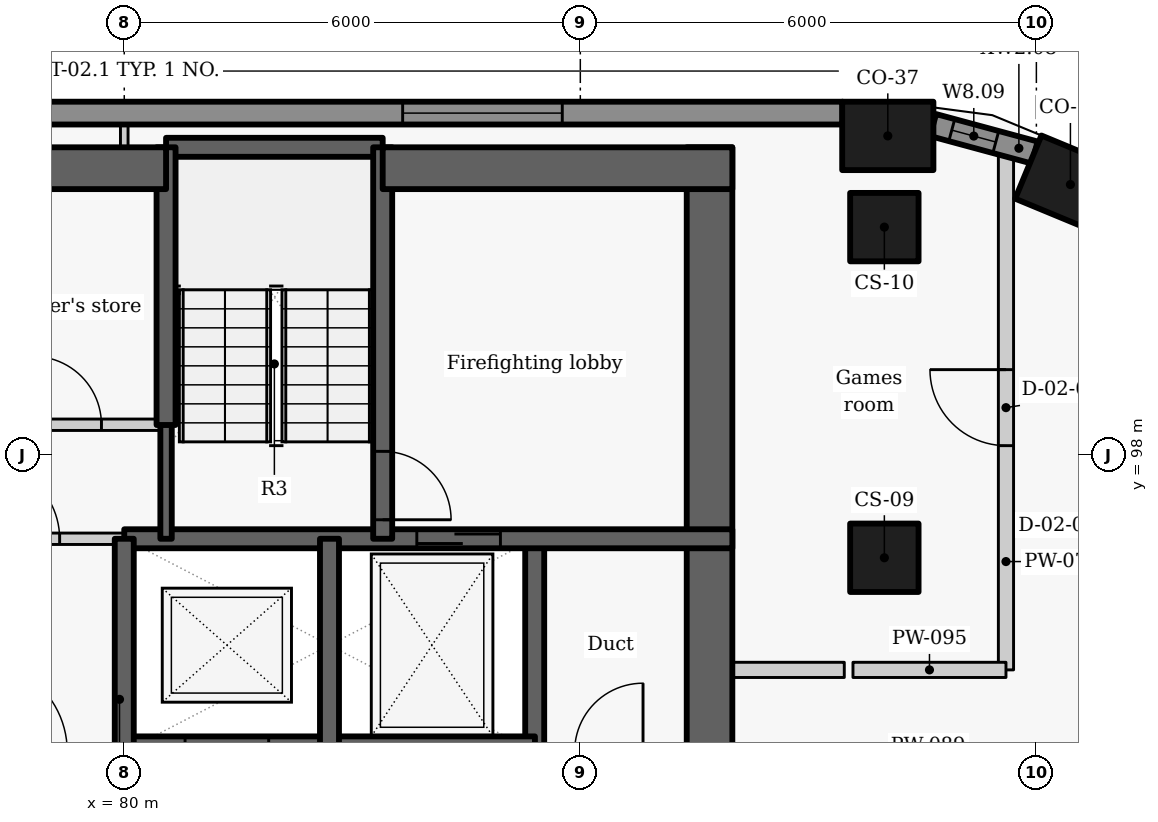
"""IFC4 building model, lengths in metres.
Left out: names, types, materials, properties, quantities, classifications, styles, units other than length and angle.
Written with IfcOpenShell. Run it as: python <this file> out.ifc"""

import sys

from ifc_helpers import new_model, si_unit, direction, frame, frame_2d, origin, origin_2d, place, context, subcontext, project, spatial, rectangle, extrude, element, fill, save


model = new_model("IFC4")
c1 = context("Model", 3, precision=1e-05, world=origin(), true_north=direction((0.0, 1.0)))
c2 = subcontext(c1, "Body", "Model", "MODEL_VIEW")
j1 = project(units=[si_unit("LENGTHUNIT", "METRE"), si_unit("PLANEANGLEUNIT", "RADIAN")], contexts=[c1])
p1 = place(None, origin())
s1 = spatial("IfcSite", under=j1, at=p1, CompositionType="ELEMENT")
p2 = place(p1, origin())
s2 = spatial("IfcBuilding", under=s1, at=p2, CompositionType="ELEMENT")
p3 = place(p2, frame((0.0, 0.0, 193.2)))
s3 = spatial("IfcBuildingStorey", under=s2, at=p3, CompositionType="ELEMENT", Elevation=193.2)
for number, where, z_axis, x_axis in (
    (1, (92.448, 101.56, 0.0), (0.0, 0.0, 1.0), (-0.924, 0.383, 0.0)),
    (2, (90.045, 102.2, 0.0), (0.0, 0.0, 1.0), (-1.0, 0.0, 0.0)),
):
    element("IfcColumn", number, at=place(p3, frame(where, z_axis=z_axis, x_axis=x_axis)), inside=s3, PredefinedType="COLUMN", context=c2, shape_type="SweptSolid", body=[
        extrude(rectangle(XDim=1.2, YDim=0.9, at=origin_2d()), origin(), (0.0, 0.0, 1.0), 3.3),
    ])
for number, where, z_axis, x_axis in (
    (3, (90.0, 96.65, 0.0), (0.0, 0.0, 1.0), (0.0, 1.0, 0.0)),
    (4, (90.0, 101.0, 0.0), (0.0, 0.0, 1.0), (0.0, 1.0, 0.0)),
):
    element("IfcColumn", number, at=place(p3, frame(where, z_axis=z_axis, x_axis=x_axis)), inside=s3, PredefinedType="COLUMN", context=c2, shape_type="SweptSolid", body=[
        extrude(rectangle(XDim=0.9, YDim=0.9, at=origin_2d()), origin(), (0.0, 0.0, 1.0), 3.3),
    ])
p4 = place(p3, frame((91.977, 101.981, 0.0), z_axis=(0.0, 0.0, 1.0), x_axis=(-0.965315341278, 0.261086751661, 0.0)))
e5 = element("IfcWall", 5, at=p4, inside=s3, PredefinedType="SOLIDWALL", context=c2, shape_type="SweptSolid", body=[
    extrude(rectangle(XDim=1.384, YDim=0.3, at=frame_2d((0.692, 0.0))), origin(), (0.0, 0.0, 1.0), 2.425),
])
p5 = place(p4, frame((0.529, 0.0, 0.9)))
e6 = element("IfcOpeningElement", 6, at=p5, cuts=e5, PredefinedType="OPENING", context=c2, shape_type="SweptSolid", body=[
    extrude(rectangle(XDim=0.6, YDim=1.1, at=frame_2d((0.3, 0.55))), frame((0.0, 0.16, 0.0), z_axis=(0.0, -1.0, 0.0), x_axis=(1.0, 0.0, 0.0)), (0.0, 0.0, 1.0), 0.32),
])
p6 = place(p3, frame((89.449, 102.5, 0.0), z_axis=(0.0, 0.0, 1.0), x_axis=(-1.0, 0.0, 0.0)))
e7 = element("IfcWall", 7, at=p6, inside=s3, PredefinedType="SOLIDWALL", context=c2, shape_type="SweptSolid", body=[
    extrude(rectangle(XDim=18.933, YDim=0.3, at=frame_2d((9.466, 0.0))), origin(), (0.0, 0.0, 1.0), 2.425),
])
p7 = place(p6, frame((3.687, 0.0, 0.9)))
e8 = element("IfcOpeningElement", 8, at=p7, cuts=e7, PredefinedType="OPENING", context=c2, shape_type="SweptSolid", body=[
    extrude(rectangle(XDim=2.1, YDim=1.1, at=frame_2d((1.05, 0.55))), frame((0.0, 0.16, 0.0), z_axis=(0.0, -1.0, 0.0), x_axis=(1.0, 0.0, 0.0)), (0.0, 0.0, 1.0), 0.32),
])
p8 = place(p6, frame((13.118, 0.0, 0.9)))
e9 = element("IfcOpeningElement", 9, at=p8, cuts=e7, PredefinedType="OPENING", context=c2, shape_type="SweptSolid", body=[
    extrude(rectangle(XDim=2.1, YDim=1.1, at=frame_2d((1.05, 0.55))), frame((0.0, 0.16, 0.0), z_axis=(0.0, -1.0, 0.0), x_axis=(1.0, 0.0, 0.0)), (0.0, 0.0, 1.0), 0.32),
])
p9 = place(p3, frame((85.4, 94.1, -0.275), z_axis=(0.0, 0.0, 1.0), x_axis=(0.0, 1.0, 0.0)))
e10 = element("IfcWall", 10, at=p9, inside=s3, PredefinedType="SHEAR", context=c2, shape_type="SweptSolid", body=[
    extrude(rectangle(XDim=2.8, YDim=0.25, at=frame_2d((1.4, 0.0))), origin(), (0.0, 0.0, 1.0), 3.3),
])
p10 = place(p3, frame((87.7, 102.05, -0.275), z_axis=(0.0, 0.0, 1.0), x_axis=(0.0, -1.0, 0.0)))
e11 = element("IfcWall", 11, at=p10, inside=s3, PredefinedType="SHEAR", context=c2, shape_type="SweptSolid", body=[
    extrude(rectangle(XDim=14.25, YDim=0.6, at=frame_2d((7.125, 0.0))), origin(), (0.0, 0.0, 1.0), 3.3),
])
p11 = place(p10, frame((8.898, 0.0, 0.275)))
e12 = element("IfcOpeningElement", 12, at=p11, cuts=e11, PredefinedType="OPENING", context=c2, shape_type="SweptSolid", body=[
    extrude(rectangle(XDim=1.5, YDim=2.1, at=frame_2d((0.75, 1.05))), frame((0.0, 0.31, 0.0), z_axis=(0.0, -1.0, 0.0), x_axis=(1.0, 0.0, 0.0)), (0.0, 0.0, 1.0), 0.62),
])
p12 = place(p3, frame((79.997, 94.1, -0.275), z_axis=(0.0, 0.0, 1.0), x_axis=(1.0, 0.0, 0.0)))
e13 = element("IfcWall", 13, at=p12, inside=s3, PredefinedType="SHEAR", context=c2, shape_type="SweptSolid", body=[
    extrude(rectangle(XDim=5.406, YDim=0.4, at=frame_2d((2.703, 0.0))), origin(), (0.0, 0.0, 1.0), 3.3),
])
p13 = place(p12, frame((0.803, 0.0, 0.275)))
e14 = element("IfcOpeningElement", 14, at=p13, cuts=e13, PredefinedType="OPENING", context=c2, shape_type="SweptSolid", body=[
    extrude(rectangle(XDim=1.1, YDim=2.1, at=frame_2d((0.55, 1.05))), frame((0.0, 0.21, 0.0), z_axis=(0.0, -1.0, 0.0), x_axis=(1.0, 0.0, 0.0)), (0.0, 0.0, 1.0), 0.42),
])
p14 = place(p3, frame((80.0, 96.9, -0.275), z_axis=(0.0, 0.0, 1.0), x_axis=(1.0, 0.0, 0.0)))
e15 = element("IfcWall", 15, at=p14, inside=s3, PredefinedType="SHEAR", context=c2, shape_type="SweptSolid", body=[
    extrude(rectangle(XDim=8.0, YDim=0.25, at=frame_2d((4.0, 0.0))), origin(), (0.0, 0.0, 1.0), 3.3),
])
p15 = place(p14, frame((3.849, 0.0, 0.275)))
e16 = element("IfcOpeningElement", 16, at=p15, cuts=e15, PredefinedType="OPENING", context=c2, shape_type="SweptSolid", body=[
    extrude(rectangle(XDim=1.1, YDim=2.1, at=frame_2d((0.55, 1.05))), frame((0.0, 0.135, 0.0), z_axis=(0.0, -1.0, 0.0), x_axis=(1.0, 0.0, 0.0)), (0.0, 0.0, 1.0), 0.27),
])
p16 = place(p3, frame((80.0, 94.1, -0.275), z_axis=(0.0, 0.0, 1.0), x_axis=(0.0, 1.0, 0.0)))
e17 = element("IfcWall", 17, at=p16, inside=s3, PredefinedType="SHEAR", context=c2, shape_type="SweptSolid", body=[
    extrude(rectangle(XDim=2.8, YDim=0.25, at=frame_2d((1.4, 0.0))), origin(), (0.0, 0.0, 1.0), 3.3),
])
p17 = place(p3, frame((77.3, 96.9, 0.0), z_axis=(0.0, 0.0, 1.0), x_axis=(1.0, 0.0, 0.0)))
e18 = element("IfcWall", 18, at=p17, inside=s3, PredefinedType="PARTITIONING", context=c2, shape_type="SweptSolid", body=[
    extrude(rectangle(XDim=2.7, YDim=0.15, at=frame_2d((1.35, 0.0))), origin(), (0.0, 0.0, 1.0), 3.025),
])
p18 = place(p17, frame((0.85, 0.0, 0.0)))
e19 = element("IfcOpeningElement", 19, at=p18, cuts=e18, PredefinedType="OPENING", context=c2, shape_type="SweptSolid", body=[
    extrude(rectangle(XDim=1.0, YDim=2.1, at=frame_2d((0.5, 1.05))), frame((0.0, 0.085, 0.0), z_axis=(0.0, -1.0, 0.0), x_axis=(1.0, 0.0, 0.0)), (0.0, 0.0, 1.0), 0.17),
])
p19 = place(p3, frame((82.7, 94.1, -0.275), z_axis=(0.0, 0.0, 1.0), x_axis=(0.0, 1.0, 0.0)))
e20 = element("IfcWall", 20, at=p19, inside=s3, PredefinedType="SHEAR", context=c2, shape_type="SweptSolid", body=[
    extrude(rectangle(XDim=2.8, YDim=0.25, at=frame_2d((1.4, 0.0))), origin(), (0.0, 0.0, 1.0), 3.3),
])
p20 = place(p3, frame((80.55, 102.05, -0.275), z_axis=(0.0, 0.0, 1.0), x_axis=(1.0, 0.0, 0.0)))
e21 = element("IfcWall", 21, at=p20, inside=s3, PredefinedType="SHEAR", context=c2, shape_type="SweptSolid", body=[
    extrude(rectangle(XDim=2.85, YDim=0.25, at=frame_2d((1.425, 0.0))), origin(), (0.0, 0.0, 1.0), 3.3),
])
p21 = place(p3, frame((83.4, 102.05, -0.275), z_axis=(0.0, 0.0, 1.0), x_axis=(0.0, -1.0, 0.0)))
e22 = element("IfcWall", 22, at=p21, inside=s3, PredefinedType="SHEAR", context=c2, shape_type="SweptSolid", body=[
    extrude(rectangle(XDim=5.15, YDim=0.25, at=frame_2d((2.575, 0.0))), origin(), (0.0, 0.0, 1.0), 3.3),
])
p22 = place(p21, frame((4.0, 0.0, 0.275)))
e23 = element("IfcOpeningElement", 23, at=p22, cuts=e22, PredefinedType="OPENING", context=c2, shape_type="SweptSolid", body=[
    extrude(rectangle(XDim=0.9, YDim=2.1, at=frame_2d((0.45, 1.05))), frame((0.0, 0.135, 0.0), z_axis=(0.0, -1.0, 0.0), x_axis=(1.0, 0.0, 0.0)), (0.0, 0.0, 1.0), 0.27),
])
p23 = place(p3, frame((80.55, 96.9, -0.275), z_axis=(0.0, 0.0, 1.0), x_axis=(0.0, 1.0, 0.0)))
e24 = element("IfcWall", 24, at=p23, inside=s3, PredefinedType="SHEAR", context=c2, shape_type="SweptSolid", body=[
    extrude(rectangle(XDim=1.503, YDim=0.15, at=frame_2d((0.751, 0.0))), origin(), (0.0, 0.0, 1.0), 3.3),
])
p24 = place(p3, frame((80.55, 98.397, -0.275), z_axis=(0.0, 0.0, 1.0), x_axis=(0.0, 1.0, 0.0)))
e25 = element("IfcWall", 25, at=p24, inside=s3, PredefinedType="SHEAR", context=c2, shape_type="SweptSolid", body=[
    extrude(rectangle(XDim=3.653, YDim=0.25, at=frame_2d((1.827, 0.0))), origin(), (0.0, 0.0, 1.0), 3.3),
])
p25 = place(p3, frame((75.35, 101.775, -0.275), z_axis=(0.0, 0.0, 1.0), x_axis=(1.0, 0.0, 0.0)))
e26 = element("IfcWall", 26, at=p25, inside=s3, PredefinedType="SHEAR", context=c2, shape_type="SweptSolid", body=[
    extrude(rectangle(XDim=5.2, YDim=0.55, at=frame_2d((2.6, 0.0))), origin(), (0.0, 0.0, 1.0), 3.3),
])
p26 = place(p3, frame((83.4, 101.775, -0.275), z_axis=(0.0, 0.0, 1.0), x_axis=(1.0, 0.0, 0.0)))
e27 = element("IfcWall", 27, at=p26, inside=s3, PredefinedType="SHEAR", context=c2, shape_type="SweptSolid", body=[
    extrude(rectangle(XDim=4.6, YDim=0.55, at=frame_2d((2.3, 0.0))), origin(), (0.0, 0.0, 1.0), 3.3),
])
p27 = place(p3, frame((75.35, 98.4, 0.0), z_axis=(0.0, 0.0, 1.0), x_axis=(1.0, 0.0, 0.0)))
e28 = element("IfcWall", 28, at=p27, inside=s3, PredefinedType="PARTITIONING", context=c2, shape_type="SweptSolid", body=[
    extrude(rectangle(XDim=5.2, YDim=0.15, at=frame_2d((2.6, 0.0))), origin(), (0.0, 0.0, 1.0), 3.025),
])
p28 = place(p27, frame((0.85, 0.0, 0.0)))
e29 = element("IfcOpeningElement", 29, at=p28, cuts=e28, PredefinedType="OPENING", context=c2, shape_type="SweptSolid", body=[
    extrude(rectangle(XDim=0.9, YDim=2.1, at=frame_2d((0.45, 1.05))), frame((0.0, 0.085, 0.0), z_axis=(0.0, -1.0, 0.0), x_axis=(1.0, 0.0, 0.0)), (0.0, 0.0, 1.0), 0.17),
])
p29 = place(p27, frame((3.45, 0.0, 0.0)))
e30 = element("IfcOpeningElement", 30, at=p29, cuts=e28, PredefinedType="OPENING", context=c2, shape_type="SweptSolid", body=[
    extrude(rectangle(XDim=0.9, YDim=2.1, at=frame_2d((0.45, 1.05))), frame((0.0, 0.085, 0.0), z_axis=(0.0, -1.0, 0.0), x_axis=(1.0, 0.0, 0.0)), (0.0, 0.0, 1.0), 0.17),
])
p30 = place(p3, frame((91.6, 95.175, 0.0), z_axis=(0.0, 0.0, 1.0), x_axis=(0.0, 1.0, 0.0)))
e31 = element("IfcWall", 31, at=p30, inside=s3, PredefinedType="PARTITIONING", context=c2, shape_type="SweptSolid", body=[
    extrude(rectangle(XDim=6.899, YDim=0.2, at=frame_2d((3.449, 0.0))), origin(), (0.0, 0.0, 1.0), 2.405),
])
p31 = place(p30, frame((2.95, 0.0, 0.0)))
e32 = element("IfcOpeningElement", 32, at=p31, cuts=e31, PredefinedType="OPENING", context=c2, shape_type="SweptSolid", body=[
    extrude(rectangle(XDim=1.0, YDim=2.1, at=frame_2d((0.5, 1.05))), frame((0.0, 0.11, 0.0), z_axis=(0.0, -1.0, 0.0), x_axis=(1.0, 0.0, 0.0)), (0.0, 0.0, 1.0), 0.22),
])
p32 = place(p3, frame((88.0, 95.175, 0.0), z_axis=(0.0, 0.0, 1.0), x_axis=(1.0, 0.0, 0.0)))
e33 = element("IfcWall", 33, at=p32, inside=s3, PredefinedType="PARTITIONING", context=c2, shape_type="SweptSolid", body=[
    extrude(rectangle(XDim=1.473, YDim=0.2, at=frame_2d((0.736, 0.0))), origin(), (0.0, 0.0, 1.0), 3.025),
])
p33 = place(p3, frame((89.587, 95.175, 0.0), z_axis=(0.0, 0.0, 1.0), x_axis=(1.0, 0.0, 0.0)))
e34 = element("IfcWall", 34, at=p33, inside=s3, PredefinedType="PARTITIONING", context=c2, shape_type="SweptSolid", body=[
    extrude(rectangle(XDim=2.013, YDim=0.2, at=frame_2d((1.006, 0.0))), origin(), (0.0, 0.0, 1.0), 2.505),
])
p34 = place(p3, frame((80.0, 102.05, 0.0), z_axis=(0.0, 0.0, 1.0), x_axis=(0.0, 1.0, 0.0)))
e35 = element("IfcWall", 35, at=p34, inside=s3, PredefinedType="PARTITIONING", context=c2, shape_type="SweptSolid", body=[
    extrude(rectangle(XDim=0.3, YDim=0.1, at=frame_2d((0.15, 0.0))), origin(), (0.0, 0.0, 1.0), 3.025),
])
p35 = place(p5, origin())
e36 = element("IfcWindow", 36, at=p35, inside=s3, PartitioningType="SINGLE_PANEL", PredefinedType="WINDOW", context=c2, shape_type="SweptSolid", body=[
    extrude(rectangle(XDim=0.6, YDim=1.1, at=frame_2d((0.3, 0.55))), frame((0.0, 0.03, 0.0), z_axis=(0.0, -1.0, 0.0), x_axis=(1.0, 0.0, 0.0)), (0.0, 0.0, 1.0), 0.06),
])
fill(e6, e36)
p36 = place(p7, origin())
e37 = element("IfcWindow", 37, at=p36, inside=s3, PartitioningType="SINGLE_PANEL", PredefinedType="WINDOW", context=c2, shape_type="SweptSolid", body=[
    extrude(rectangle(XDim=2.1, YDim=1.1, at=frame_2d((1.05, 0.55))), frame((0.0, 0.03, 0.0), z_axis=(0.0, -1.0, 0.0), x_axis=(1.0, 0.0, 0.0)), (0.0, 0.0, 1.0), 0.06),
])
fill(e8, e37)
p37 = place(p15, origin())
e38 = element("IfcDoor", 38, at=p37, inside=s3, OperationType="SLIDING_TO_LEFT", PredefinedType="DOOR", context=c2, shape_type="SweptSolid", body=[
    extrude(rectangle(XDim=1.1, YDim=2.1, at=frame_2d((0.55, 1.05))), frame((0.0, 0.025, 0.0), z_axis=(0.0, -1.0, 0.0), x_axis=(1.0, 0.0, 0.0)), (0.0, 0.0, 1.0), 0.05),
])
fill(e16, e38)
p38 = place(p18, origin())
e39 = element("IfcDoor", 39, at=p38, inside=s3, OperationType="SINGLE_SWING_LEFT", PredefinedType="DOOR", context=c2, shape_type="SweptSolid", body=[
    extrude(rectangle(XDim=1.0, YDim=2.1, at=frame_2d((0.5, 1.05))), frame((0.0, 0.025, 0.0), z_axis=(0.0, -1.0, 0.0), x_axis=(1.0, 0.0, 0.0)), (0.0, 0.0, 1.0), 0.05),
])
fill(e19, e39)
p39 = place(p29, origin())
e40 = element("IfcDoor", 40, at=p39, inside=s3, OperationType="SINGLE_SWING_LEFT", PredefinedType="DOOR", context=c2, shape_type="SweptSolid", body=[
    extrude(rectangle(XDim=0.9, YDim=2.1, at=frame_2d((0.45, 1.05))), frame((0.0, 0.025, 0.0), z_axis=(0.0, -1.0, 0.0), x_axis=(1.0, 0.0, 0.0)), (0.0, 0.0, 1.0), 0.05),
])
fill(e30, e40)
p40 = place(p22, origin())
e41 = element("IfcDoor", 41, at=p40, inside=s3, OperationType="SINGLE_SWING_RIGHT", PredefinedType="DOOR", context=c2, shape_type="SweptSolid", body=[
    extrude(rectangle(XDim=0.9, YDim=2.1, at=frame_2d((0.45, 1.05))), frame((0.0, 0.025, 0.0), z_axis=(0.0, -1.0, 0.0), x_axis=(1.0, 0.0, 0.0)), (0.0, 0.0, 1.0), 0.05),
])
fill(e23, e41)
p41 = place(p31, origin())
e42 = element("IfcDoor", 42, at=p41, inside=s3, OperationType="SINGLE_SWING_RIGHT", PredefinedType="DOOR", context=c2, shape_type="SweptSolid", body=[
    extrude(rectangle(XDim=1.0, YDim=2.1, at=frame_2d((0.5, 1.05))), frame((0.0, 0.025, 0.0), z_axis=(0.0, -1.0, 0.0), x_axis=(1.0, 0.0, 0.0)), (0.0, 0.0, 1.0), 0.05),
])
fill(e32, e42)
save(model, sys.argv[1])
